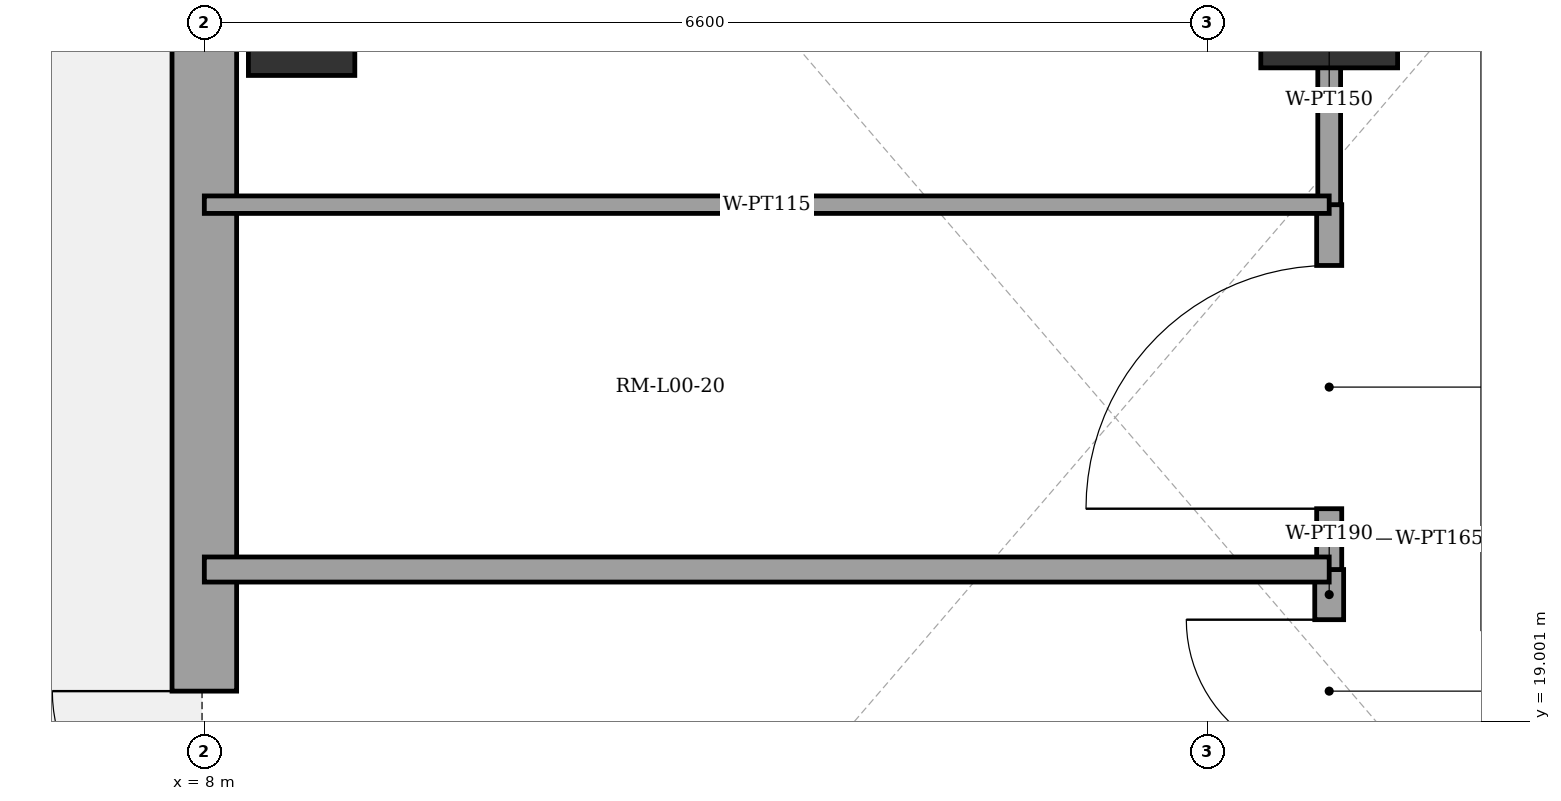
"""IFC4 building model, lengths in metres.
Left out: names, types, materials, properties, quantities, classifications, styles, units other than length and angle.
Written with IfcOpenShell. Run it as: python <this file> out.ifc"""

import sys

from ifc_helpers import new_model, si_unit, direction, frame, frame_2d, origin, origin_2d, place, context, subcontext, project, spatial, rectangle, extrude, element, fill, save


model = new_model("IFC4")
c1 = context("Model", 3, precision=1e-05, world=origin(), true_north=direction((0.0, 1.0)))
c2 = subcontext(c1, "Body", "Model", "MODEL_VIEW")
j1 = project(units=[si_unit("LENGTHUNIT", "METRE"), si_unit("PLANEANGLEUNIT", "RADIAN")], contexts=[c1])
p1 = place(None, origin())
s1 = spatial("IfcSite", under=j1, at=p1, CompositionType="ELEMENT")
p2 = place(p1, origin())
s2 = spatial("IfcBuilding", under=s1, at=p2, CompositionType="ELEMENT")
p3 = place(p2, origin())
s3 = spatial("IfcBuildingStorey", under=s2, at=p3, CompositionType="ELEMENT", Elevation=0.0)
p4 = place(p3, frame((8.64, 23.6, 0.0), z_axis=(0.0, 0.0, 1.0), x_axis=(1.0, 0.0, 0.0)))
e1 = element("IfcColumn", 1, at=p4, inside=s3, PredefinedType="COLUMN", context=c2, shape_type="SweptSolid", body=[
    extrude(rectangle(XDim=0.7, YDim=0.7, at=origin_2d()), origin(), (0.0, 0.0, 1.0), 5.4),
])
p5 = place(p3, frame((15.4, 23.6, 0.0), z_axis=(0.0, 0.0, 1.0), x_axis=(1.0, 0.0, 0.0)))
e2 = element("IfcColumn", 2, at=p5, inside=s3, PredefinedType="COLUMN", context=c2, shape_type="SweptSolid", body=[
    extrude(rectangle(XDim=0.6, YDim=0.9, at=origin_2d()), origin(), (0.0, 0.0, 1.0), 5.4),
])
p6 = place(p3, frame((8.0, 7.74, 0.0), z_axis=(0.0, 0.0, 1.0), x_axis=(0.0, 1.0, 0.0)))
e3 = element("IfcWall", 3, at=p6, inside=s3, PredefinedType="SOLIDWALL", context=c2, shape_type="SweptSolid", body=[
    extrude(rectangle(XDim=55.72, YDim=0.425, at=frame_2d((27.86, 0.0))), origin(), (0.0, 0.0, 1.0), 5.14),
])
p7 = place(p6, frame((1.1, 0.0, 0.0)))
e4 = element("IfcOpeningElement", 4, at=p7, cuts=e3, PredefinedType="OPENING", context=c2, shape_type="SweptSolid", body=[
    extrude(rectangle(XDim=1.15, YDim=2.2, at=frame_2d((0.575, 1.1))), frame((0.0, 0.222, 0.0), z_axis=(0.0, -1.0, 0.0), x_axis=(1.0, 0.0, 0.0)), (0.0, 0.0, 1.0), 0.445),
])
p8 = place(p6, frame((9.46, 0.0, 0.0)))
e5 = element("IfcOpeningElement", 5, at=p8, cuts=e3, PredefinedType="OPENING", context=c2, shape_type="SweptSolid", body=[
    extrude(rectangle(XDim=2.0, YDim=2.5, at=frame_2d((1.0, 1.25))), frame((0.0, 0.222, 0.0), z_axis=(0.0, -1.0, 0.0), x_axis=(1.0, 0.0, 0.0)), (0.0, 0.0, 1.0), 0.445),
])
p9 = place(p3, frame((15.4, 18.4, 0.0), z_axis=(0.0, 0.0, 1.0), x_axis=(0.0, 1.0, 0.0)))
e6 = element("IfcWall", 6, at=p9, inside=s3, PredefinedType="PARTITIONING", context=c2, shape_type="SweptSolid", body=[
    extrude(rectangle(XDim=1.6, YDim=0.19, at=frame_2d((0.8, 0.0))), origin(), (0.0, 0.0, 1.0), 4.29),
])
p10 = place(p9, frame((0.33, 0.0, 0.0)))
e7 = element("IfcOpeningElement", 7, at=p10, cuts=e6, PredefinedType="OPENING", context=c2, shape_type="SweptSolid", body=[
    extrude(rectangle(XDim=0.94, YDim=2.15, at=frame_2d((0.47, 1.075))), frame((0.0, 0.105, 0.0), z_axis=(0.0, -1.0, 0.0), x_axis=(1.0, 0.0, 0.0)), (0.0, 0.0, 1.0), 0.21),
])
p11 = place(p3, frame((15.4, 20.0, 0.0), z_axis=(0.0, 0.0, 1.0), x_axis=(0.0, 1.0, 0.0)))
e8 = element("IfcWall", 8, at=p11, inside=s3, PredefinedType="PARTITIONING", context=c2, shape_type="SweptSolid", body=[
    extrude(rectangle(XDim=2.4, YDim=0.165, at=frame_2d((1.2, 0.0))), origin(), (0.0, 0.0, 1.0), 4.29),
])
p12 = place(p11, frame((0.4, 0.0, 0.0)))
e9 = element("IfcOpeningElement", 9, at=p12, cuts=e8, PredefinedType="OPENING", context=c2, shape_type="SweptSolid", body=[
    extrude(rectangle(XDim=1.6, YDim=2.3, at=frame_2d((0.8, 1.15))), frame((0.0, 0.093, 0.0), z_axis=(0.0, -1.0, 0.0), x_axis=(1.0, 0.0, 0.0)), (0.0, 0.0, 1.0), 0.185),
])
p13 = place(p3, frame((15.4, 22.4, 0.0), z_axis=(0.0, 0.0, 1.0), x_axis=(0.0, 1.0, 0.0)))
e10 = element("IfcWall", 10, at=p13, inside=s3, PredefinedType="PARTITIONING", context=c2, shape_type="SweptSolid", body=[
    extrude(rectangle(XDim=4.0, YDim=0.15, at=frame_2d((2.0, 0.0))), origin(), (0.0, 0.0, 1.0), 4.29),
])
p14 = place(p13, frame((2.18, 0.0, 0.0)))
e11 = element("IfcOpeningElement", 11, at=p14, cuts=e10, PredefinedType="OPENING", context=c2, shape_type="SweptSolid", body=[
    extrude(rectangle(XDim=0.92, YDim=2.1, at=frame_2d((0.46, 1.05))), frame((0.0, 0.085, 0.0), z_axis=(0.0, -1.0, 0.0), x_axis=(1.0, 0.0, 0.0)), (0.0, 0.0, 1.0), 0.17),
])
p15 = place(p3, frame((8.0, 20.0, 0.0), z_axis=(0.0, 0.0, 1.0), x_axis=(1.0, 0.0, 0.0)))
e12 = element("IfcWall", 12, at=p15, inside=s3, PredefinedType="PARTITIONING", context=c2, shape_type="SweptSolid", body=[
    extrude(rectangle(XDim=7.4, YDim=0.165, at=frame_2d((3.7, 0.0))), origin(), (0.0, 0.0, 1.0), 5.14),
])
p16 = place(p3, frame((8.0, 22.4, 0.0), z_axis=(0.0, 0.0, 1.0), x_axis=(1.0, 0.0, 0.0)))
e13 = element("IfcWall", 13, at=p16, inside=s3, PredefinedType="PARTITIONING", context=c2, shape_type="SweptSolid", body=[
    extrude(rectangle(XDim=7.4, YDim=0.115, at=frame_2d((3.7, 0.0))), origin(), (0.0, 0.0, 1.0), 5.14),
])
p17 = place(p8, origin())
e14 = element("IfcDoor", 14, at=p17, inside=s3, OperationType="DOUBLE_SWING_LEFT", PredefinedType="DOOR", context=c2, shape_type="SweptSolid", body=[
    extrude(rectangle(XDim=2.0, YDim=2.5, at=frame_2d((1.0, 1.25))), frame((0.0, 0.025, 0.0), z_axis=(0.0, -1.0, 0.0), x_axis=(1.0, 0.0, 0.0)), (0.0, 0.0, 1.0), 0.05),
])
fill(e5, e14)
p18 = place(p10, origin())
e15 = element("IfcDoor", 15, at=p18, inside=s3, OperationType="SINGLE_SWING_RIGHT", PredefinedType="DOOR", context=c2, shape_type="SweptSolid", body=[
    extrude(rectangle(XDim=0.94, YDim=2.15, at=frame_2d((0.47, 1.075))), frame((0.0, 0.025, 0.0), z_axis=(0.0, -1.0, 0.0), x_axis=(1.0, 0.0, 0.0)), (0.0, 0.0, 1.0), 0.05),
])
fill(e7, e15)
p19 = place(p12, origin())
e16 = element("IfcDoor", 16, at=p19, inside=s3, OperationType="SINGLE_SWING_LEFT", PredefinedType="DOOR", context=c2, shape_type="SweptSolid", body=[
    extrude(rectangle(XDim=1.6, YDim=2.3, at=frame_2d((0.8, 1.15))), frame((0.0, 0.025, 0.0), z_axis=(0.0, -1.0, 0.0), x_axis=(1.0, 0.0, 0.0)), (0.0, 0.0, 1.0), 0.05),
])
fill(e9, e16)
save(model, sys.argv[1])
